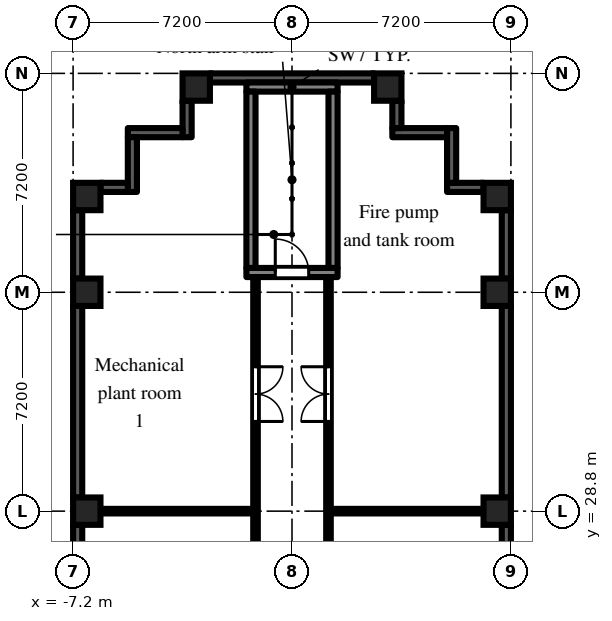
"""IFC4 building model, lengths in metres.
Left out: names, types, materials, properties, quantities, classifications, styles, units other than length and angle.
Written with IfcOpenShell. Run it as: python <this file> out.ifc"""

import sys

from ifc_helpers import new_model, si_unit, direction, frame, frame_2d, origin, origin_2d, place, context, subcontext, project, spatial, polyline, rectangle, outline, extrude, element, fill, save


model = new_model("IFC4")
c1 = context("Model", 3, precision=1e-05, world=origin(), true_north=direction((0.0, 1.0)))
c2 = subcontext(c1, "Body", "Model", "MODEL_VIEW")
j1 = project(units=[si_unit("LENGTHUNIT", "METRE"), si_unit("PLANEANGLEUNIT", "RADIAN")], contexts=[c1])
p1 = place(None, origin())
s1 = spatial("IfcSite", under=j1, at=p1, CompositionType="ELEMENT")
p2 = place(p1, origin())
s2 = spatial("IfcBuilding", under=s1, at=p2, CompositionType="ELEMENT")
p3 = place(p2, frame((0.0, 0.0, 62.7)))
s3 = spatial("IfcBuildingStorey", under=s2, at=p3, CompositionType="ELEMENT", Elevation=62.7)
for number, where, z_axis, x_axis in (
    (1, (-6.75, 28.8, 0.0), (0.0, 0.0, 1.0), (1.0, 0.0, 0.0)),
    (2, (-6.75, 36.0, 0.0), (0.0, 0.0, 1.0), (1.0, 0.0, 0.0)),
    (3, (-6.75, 39.15, 0.0), (0.0, 0.0, 1.0), (1.0, 0.0, 0.0)),
    (4, (-3.15, 42.75, 0.0), (0.0, 0.0, 1.0), (1.0, 0.0, 0.0)),
    (5, (3.15, 42.75, 0.0), (0.0, 0.0, 1.0), (1.0, 0.0, 0.0)),
    (6, (6.75, 28.8, 0.0), (0.0, 0.0, 1.0), (1.0, 0.0, 0.0)),
    (7, (6.75, 36.0, 0.0), (0.0, 0.0, 1.0), (1.0, 0.0, 0.0)),
    (8, (6.75, 39.15, 0.0), (0.0, 0.0, 1.0), (1.0, 0.0, 0.0)),
):
    element("IfcColumn", number, at=place(p3, frame(where, z_axis=z_axis, x_axis=x_axis)), inside=s3, PredefinedType="COLUMN", context=c2, shape_type="SweptSolid", body=[
        extrude(rectangle(XDim=0.9, YDim=0.9, at=origin_2d()), origin(), (0.0, 0.0, 1.0), 4.2),
    ])
p4 = place(p3, frame((7.05, 22.05, 0.0), z_axis=(0.0, 0.0, 1.0), x_axis=(0.0, 1.0, 0.0)))
e9 = element("IfcWall", 9, at=p4, inside=s3, PredefinedType="SOLIDWALL", context=c2, shape_type="SweptSolid", body=[
    extrude(outline(polyline([(0.0, 0.0), (6.3, 0.0), (6.3, 3.775), (1.952, 3.775), (1.95, 3.4), (1.15, 3.4), (1.148, 3.775), (0.0, 3.775), (0.0, 0.0)])), frame((0.0, 0.15, 0.0), z_axis=(0.0, -1.0, 0.0), x_axis=(1.0, 0.0, 0.0)), (0.0, 0.0, 1.0), 0.3),
])
p5 = place(p3, frame((7.05, 29.25, 0.0), z_axis=(0.0, 0.0, 1.0), x_axis=(0.0, 1.0, 0.0)))
e10 = element("IfcWall", 10, at=p5, inside=s3, PredefinedType="SOLIDWALL", context=c2, shape_type="SweptSolid", body=[
    extrude(rectangle(XDim=6.3, YDim=0.3, at=frame_2d((3.15, 0.0))), origin(), (0.0, 0.0, 1.0), 3.775),
])
p6 = place(p3, frame((7.05, 36.45, 0.0), z_axis=(0.0, 0.0, 1.0), x_axis=(0.0, 1.0, 0.0)))
e11 = element("IfcWall", 11, at=p6, inside=s3, PredefinedType="SOLIDWALL", context=c2, shape_type="SweptSolid", body=[
    extrude(rectangle(XDim=2.25, YDim=0.3, at=frame_2d((1.125, 0.0))), origin(), (0.0, 0.0, 1.0), 3.775),
])
p7 = place(p3, frame((6.3, 39.45, 0.0), z_axis=(0.0, 0.0, 1.0), x_axis=(-1.0, 0.0, 0.0)))
e12 = element("IfcWall", 12, at=p7, inside=s3, PredefinedType="SOLIDWALL", context=c2, shape_type="SweptSolid", body=[
    extrude(rectangle(XDim=1.2, YDim=0.3, at=frame_2d((0.6, 0.0))), origin(), (0.0, 0.0, 1.0), 3.775),
])
p8 = place(p3, frame((5.25, 39.6, 0.0), z_axis=(0.0, 0.0, 1.0), x_axis=(0.0, 1.0, 0.0)))
e13 = element("IfcWall", 13, at=p8, inside=s3, PredefinedType="SOLIDWALL", context=c2, shape_type="SweptSolid", body=[
    extrude(rectangle(XDim=1.8, YDim=0.3, at=frame_2d((0.9, 0.0))), origin(), (0.0, 0.0, 1.0), 3.775),
])
p9 = place(p3, frame((5.1, 41.25, 0.0), z_axis=(0.0, 0.0, 1.0), x_axis=(-1.0, 0.0, 0.0)))
e14 = element("IfcWall", 14, at=p9, inside=s3, PredefinedType="SOLIDWALL", context=c2, shape_type="SweptSolid", body=[
    extrude(rectangle(XDim=1.8, YDim=0.3, at=frame_2d((0.9, 0.0))), origin(), (0.0, 0.0, 1.0), 3.775),
])
p10 = place(p3, frame((3.45, 41.4, 0.0), z_axis=(0.0, 0.0, 1.0), x_axis=(0.0, 1.0, 0.0)))
e15 = element("IfcWall", 15, at=p10, inside=s3, PredefinedType="SOLIDWALL", context=c2, shape_type="SweptSolid", body=[
    extrude(rectangle(XDim=0.9, YDim=0.3, at=frame_2d((0.45, 0.0))), origin(), (0.0, 0.0, 1.0), 3.775),
])
p11 = place(p3, frame((2.7, 43.05, 0.0), z_axis=(0.0, 0.0, 1.0), x_axis=(-1.0, 0.0, 0.0)))
e16 = element("IfcWall", 16, at=p11, inside=s3, PredefinedType="SOLIDWALL", context=c2, shape_type="SweptSolid", body=[
    extrude(rectangle(XDim=5.4, YDim=0.3, at=frame_2d((2.7, 0.0))), origin(), (0.0, 0.0, 1.0), 3.775),
])
p12 = place(p3, frame((-3.45, 42.3, 0.0), z_axis=(0.0, 0.0, 1.0), x_axis=(0.0, -1.0, 0.0)))
e17 = element("IfcWall", 17, at=p12, inside=s3, PredefinedType="SOLIDWALL", context=c2, shape_type="SweptSolid", body=[
    extrude(rectangle(XDim=1.2, YDim=0.3, at=frame_2d((0.6, 0.0))), origin(), (0.0, 0.0, 1.0), 3.775),
])
p13 = place(p3, frame((-3.6, 41.25, 0.0), z_axis=(0.0, 0.0, 1.0), x_axis=(-1.0, 0.0, 0.0)))
e18 = element("IfcWall", 18, at=p13, inside=s3, PredefinedType="SOLIDWALL", context=c2, shape_type="SweptSolid", body=[
    extrude(rectangle(XDim=1.8, YDim=0.3, at=frame_2d((0.9, 0.0))), origin(), (0.0, 0.0, 1.0), 3.775),
])
p14 = place(p3, frame((-5.25, 41.1, 0.0), z_axis=(0.0, 0.0, 1.0), x_axis=(0.0, -1.0, 0.0)))
e19 = element("IfcWall", 19, at=p14, inside=s3, PredefinedType="SOLIDWALL", context=c2, shape_type="SweptSolid", body=[
    extrude(rectangle(XDim=1.8, YDim=0.3, at=frame_2d((0.9, 0.0))), origin(), (0.0, 0.0, 1.0), 3.775),
])
p15 = place(p3, frame((-5.4, 39.45, 0.0), z_axis=(0.0, 0.0, 1.0), x_axis=(-1.0, 0.0, 0.0)))
e20 = element("IfcWall", 20, at=p15, inside=s3, PredefinedType="SOLIDWALL", context=c2, shape_type="SweptSolid", body=[
    extrude(rectangle(XDim=0.9, YDim=0.3, at=frame_2d((0.45, 0.0))), origin(), (0.0, 0.0, 1.0), 3.775),
])
p16 = place(p3, frame((-7.05, 38.7, 0.0), z_axis=(0.0, 0.0, 1.0), x_axis=(0.0, -1.0, 0.0)))
e21 = element("IfcWall", 21, at=p16, inside=s3, PredefinedType="SOLIDWALL", context=c2, shape_type="SweptSolid", body=[
    extrude(rectangle(XDim=2.25, YDim=0.3, at=frame_2d((1.125, 0.0))), origin(), (0.0, 0.0, 1.0), 3.775),
])
p17 = place(p3, frame((-7.05, 35.55, 0.0), z_axis=(0.0, 0.0, 1.0), x_axis=(0.0, -1.0, 0.0)))
e22 = element("IfcWall", 22, at=p17, inside=s3, PredefinedType="SOLIDWALL", context=c2, shape_type="SweptSolid", body=[
    extrude(rectangle(XDim=6.3, YDim=0.3, at=frame_2d((3.15, 0.0))), origin(), (0.0, 0.0, 1.0), 3.775),
])
p18 = place(p3, frame((-7.05, 28.35, 0.0), z_axis=(0.0, 0.0, 1.0), x_axis=(0.0, -1.0, 0.0)))
e23 = element("IfcWall", 23, at=p18, inside=s3, PredefinedType="SOLIDWALL", context=c2, shape_type="SweptSolid", body=[
    extrude(outline(polyline([(0.0, 0.0), (6.3, 0.0), (6.3, 3.775), (5.152, 3.775), (5.15, 3.4), (4.35, 3.4), (4.348, 3.775), (0.0, 3.775), (0.0, 0.0)])), frame((0.0, 0.15, 0.0), z_axis=(0.0, -1.0, 0.0), x_axis=(1.0, 0.0, 0.0)), (0.0, 0.0, 1.0), 0.3),
])
p19 = place(p3, frame((-1.5, 36.65, 0.0), z_axis=(0.0, 0.0, 1.0), x_axis=(1.0, 0.0, 0.0)))
e24 = element("IfcWall", 24, at=p19, inside=s3, PredefinedType="SHEAR", context=c2, shape_type="SweptSolid", body=[
    extrude(rectangle(XDim=3.0, YDim=0.3, at=frame_2d((1.5, 0.0))), origin(), (0.0, 0.0, 1.0), 3.775),
])
p20 = place(p19, frame((0.95, 0.0, 0.0)))
e25 = element("IfcOpeningElement", 25, at=p20, cuts=e24, PredefinedType="OPENING", context=c2, shape_type="SweptSolid", body=[
    extrude(rectangle(XDim=1.1, YDim=2.1, at=frame_2d((0.55, 1.05))), frame((0.0, 0.16, 0.0), z_axis=(0.0, -1.0, 0.0), x_axis=(1.0, 0.0, 0.0)), (0.0, 0.0, 1.0), 0.32),
])
p21 = place(p3, frame((-1.5, 42.75, 0.0), z_axis=(0.0, 0.0, 1.0), x_axis=(1.0, 0.0, 0.0)))
e26 = element("IfcWall", 26, at=p21, inside=s3, PredefinedType="SHEAR", context=c2, shape_type="SweptSolid", body=[
    extrude(rectangle(XDim=3.0, YDim=0.3, at=frame_2d((1.5, 0.0))), origin(), (0.0, 0.0, 1.0), 3.775),
])
for number, where, z_axis, x_axis in (
    (27, (-1.35, 36.8, 0.0), (0.0, 0.0, 1.0), (0.0, 1.0, 0.0)),
    (28, (1.35, 36.8, 0.0), (0.0, 0.0, 1.0), (0.0, 1.0, 0.0)),
):
    element("IfcWall", number, at=place(p3, frame(where, z_axis=z_axis, x_axis=x_axis)), inside=s3, PredefinedType="SHEAR", context=c2, shape_type="SweptSolid", body=[
        extrude(rectangle(XDim=5.8, YDim=0.3, at=frame_2d((2.9, 0.0))), origin(), (0.0, 0.0, 1.0), 3.775),
    ])
p22 = place(p3, frame((-6.9, 28.8, 0.0), z_axis=(0.0, 0.0, 1.0), x_axis=(1.0, 0.0, 0.0)))
e29 = element("IfcWall", 29, at=p22, inside=s3, PredefinedType="PARTITIONING", context=c2, shape_type="SweptSolid", body=[
    extrude(rectangle(XDim=5.625, YDim=0.15, at=frame_2d((2.812, 0.0))), origin(), (0.0, 0.0, 1.0), 3.775),
])
p23 = place(p3, frame((-1.2, 1.125, 0.0), z_axis=(0.0, 0.0, 1.0), x_axis=(0.0, 1.0, 0.0)))
e30 = element("IfcWall", 30, at=p23, inside=s3, PredefinedType="PARTITIONING", context=c2, shape_type="SweptSolid", body=[
    extrude(outline(polyline([(0.0, 0.0), (35.375, 0.0), (35.375, 3.775), (22.877, 3.775), (22.875, 3.4), (22.075, 3.4), (22.073, 3.775), (0.0, 3.775), (0.0, 0.0)])), frame((0.0, 0.075, 0.0), z_axis=(0.0, -1.0, 0.0), x_axis=(1.0, 0.0, 0.0)), (0.0, 0.0, 1.0), 0.15),
])
p24 = place(p23, frame((4.025, 0.0, 0.0)))
e31 = element("IfcOpeningElement", 31, at=p24, cuts=e30, PredefinedType="OPENING", context=c2, shape_type="SweptSolid", body=[
    extrude(rectangle(XDim=1.2, YDim=2.1, at=frame_2d((0.6, 1.05))), frame((0.0, 0.085, 0.0), z_axis=(0.0, -1.0, 0.0), x_axis=(1.0, 0.0, 0.0)), (0.0, 0.0, 1.0), 0.17),
])
p25 = place(p23, frame((8.775, 0.0, 0.0)))
e32 = element("IfcOpeningElement", 32, at=p25, cuts=e30, PredefinedType="OPENING", context=c2, shape_type="SweptSolid", body=[
    extrude(rectangle(XDim=1.8, YDim=2.1, at=frame_2d((0.9, 1.05))), frame((0.0, 0.085, 0.0), z_axis=(0.0, -1.0, 0.0), x_axis=(1.0, 0.0, 0.0)), (0.0, 0.0, 1.0), 0.17),
])
p26 = place(p23, frame((15.975, 0.0, 0.0)))
e33 = element("IfcOpeningElement", 33, at=p26, cuts=e30, PredefinedType="OPENING", context=c2, shape_type="SweptSolid", body=[
    extrude(rectangle(XDim=1.8, YDim=2.1, at=frame_2d((0.9, 1.05))), frame((0.0, 0.085, 0.0), z_axis=(0.0, -1.0, 0.0), x_axis=(1.0, 0.0, 0.0)), (0.0, 0.0, 1.0), 0.17),
])
p27 = place(p23, frame((23.175, 0.0, 0.0)))
e34 = element("IfcOpeningElement", 34, at=p27, cuts=e30, PredefinedType="OPENING", context=c2, shape_type="SweptSolid", body=[
    extrude(rectangle(XDim=1.8, YDim=2.1, at=frame_2d((0.9, 1.05))), frame((0.0, 0.085, 0.0), z_axis=(0.0, -1.0, 0.0), x_axis=(1.0, 0.0, 0.0)), (0.0, 0.0, 1.0), 0.17),
])
p28 = place(p23, frame((30.625, 0.0, 0.0)))
e35 = element("IfcOpeningElement", 35, at=p28, cuts=e30, PredefinedType="OPENING", context=c2, shape_type="SweptSolid", body=[
    extrude(rectangle(XDim=1.8, YDim=2.1, at=frame_2d((0.9, 1.05))), frame((0.0, 0.085, 0.0), z_axis=(0.0, -1.0, 0.0), x_axis=(1.0, 0.0, 0.0)), (0.0, 0.0, 1.0), 0.17),
])
p29 = place(p3, frame((1.2, 1.125, 0.0), z_axis=(0.0, 0.0, 1.0), x_axis=(0.0, 1.0, 0.0)))
e36 = element("IfcWall", 36, at=p29, inside=s3, PredefinedType="PARTITIONING", context=c2, shape_type="SweptSolid", body=[
    extrude(outline(polyline([(0.0, 0.0), (35.375, 0.0), (35.375, 3.775), (22.877, 3.775), (22.875, 3.4), (22.075, 3.4), (22.073, 3.775), (0.0, 3.775), (0.0, 0.0)])), frame((0.0, 0.075, 0.0), z_axis=(0.0, -1.0, 0.0), x_axis=(1.0, 0.0, 0.0)), (0.0, 0.0, 1.0), 0.15),
])
p30 = place(p29, frame((0.175, 0.0, 0.0)))
e37 = element("IfcOpeningElement", 37, at=p30, cuts=e36, PredefinedType="OPENING", context=c2, shape_type="SweptSolid", body=[
    extrude(rectangle(XDim=0.9, YDim=2.1, at=frame_2d((0.45, 1.05))), frame((0.0, 0.085, 0.0), z_axis=(0.0, -1.0, 0.0), x_axis=(1.0, 0.0, 0.0)), (0.0, 0.0, 1.0), 0.17),
])
p31 = place(p29, frame((4.225, 0.0, 0.0)))
e38 = element("IfcOpeningElement", 38, at=p31, cuts=e36, PredefinedType="OPENING", context=c2, shape_type="SweptSolid", body=[
    extrude(rectangle(XDim=1.2, YDim=2.1, at=frame_2d((0.6, 1.05))), frame((0.0, 0.085, 0.0), z_axis=(0.0, -1.0, 0.0), x_axis=(1.0, 0.0, 0.0)), (0.0, 0.0, 1.0), 0.17),
])
p32 = place(p29, frame((8.775, 0.0, 0.0)))
e39 = element("IfcOpeningElement", 39, at=p32, cuts=e36, PredefinedType="OPENING", context=c2, shape_type="SweptSolid", body=[
    extrude(rectangle(XDim=1.8, YDim=2.1, at=frame_2d((0.9, 1.05))), frame((0.0, 0.085, 0.0), z_axis=(0.0, -1.0, 0.0), x_axis=(1.0, 0.0, 0.0)), (0.0, 0.0, 1.0), 0.17),
])
p33 = place(p29, frame((15.975, 0.0, 0.0)))
e40 = element("IfcOpeningElement", 40, at=p33, cuts=e36, PredefinedType="OPENING", context=c2, shape_type="SweptSolid", body=[
    extrude(rectangle(XDim=1.8, YDim=2.1, at=frame_2d((0.9, 1.05))), frame((0.0, 0.085, 0.0), z_axis=(0.0, -1.0, 0.0), x_axis=(1.0, 0.0, 0.0)), (0.0, 0.0, 1.0), 0.17),
])
p34 = place(p29, frame((23.175, 0.0, 0.0)))
e41 = element("IfcOpeningElement", 41, at=p34, cuts=e36, PredefinedType="OPENING", context=c2, shape_type="SweptSolid", body=[
    extrude(rectangle(XDim=1.8, YDim=2.1, at=frame_2d((0.9, 1.05))), frame((0.0, 0.085, 0.0), z_axis=(0.0, -1.0, 0.0), x_axis=(1.0, 0.0, 0.0)), (0.0, 0.0, 1.0), 0.17),
])
p35 = place(p29, frame((30.625, 0.0, 0.0)))
e42 = element("IfcOpeningElement", 42, at=p35, cuts=e36, PredefinedType="OPENING", context=c2, shape_type="SweptSolid", body=[
    extrude(rectangle(XDim=1.8, YDim=2.1, at=frame_2d((0.9, 1.05))), frame((0.0, 0.085, 0.0), z_axis=(0.0, -1.0, 0.0), x_axis=(1.0, 0.0, 0.0)), (0.0, 0.0, 1.0), 0.17),
])
p36 = place(p3, frame((1.275, 28.8, 0.0), z_axis=(0.0, 0.0, 1.0), x_axis=(1.0, 0.0, 0.0)))
e43 = element("IfcWall", 43, at=p36, inside=s3, PredefinedType="PARTITIONING", context=c2, shape_type="SweptSolid", body=[
    extrude(rectangle(XDim=5.625, YDim=0.15, at=frame_2d((2.812, 0.0))), origin(), (0.0, 0.0, 1.0), 3.775),
])
p37 = place(p20, origin())
e44 = element("IfcDoor", 44, at=p37, inside=s3, OperationType="SINGLE_SWING_LEFT", PredefinedType="DOOR", context=c2, shape_type="SweptSolid", body=[
    extrude(rectangle(XDim=1.1, YDim=2.1, at=frame_2d((0.55, 1.05))), frame((0.0, 0.025, 0.0), z_axis=(0.0, -1.0, 0.0), x_axis=(1.0, 0.0, 0.0)), (0.0, 0.0, 1.0), 0.05),
])
fill(e25, e44)
p38 = place(p28, frame((1.8, 0.0, 0.0), z_axis=(0.0, 0.0, 1.0), x_axis=(-1.0, 0.0, 0.0)))
e45 = element("IfcDoor", 45, at=p38, inside=s3, OperationType="DOUBLE_DOOR_DOUBLE_SWING", PredefinedType="DOOR", context=c2, shape_type="SweptSolid", body=[
    extrude(rectangle(XDim=1.8, YDim=2.1, at=frame_2d((0.9, 1.05))), frame((0.0, 0.025, 0.0), z_axis=(0.0, -1.0, 0.0), x_axis=(1.0, 0.0, 0.0)), (0.0, 0.0, 1.0), 0.05),
])
fill(e35, e45)
p39 = place(p35, origin())
e46 = element("IfcDoor", 46, at=p39, inside=s3, OperationType="DOUBLE_DOOR_DOUBLE_SWING", PredefinedType="DOOR", context=c2, shape_type="SweptSolid", body=[
    extrude(rectangle(XDim=1.8, YDim=2.1, at=frame_2d((0.9, 1.05))), frame((0.0, 0.025, 0.0), z_axis=(0.0, -1.0, 0.0), x_axis=(1.0, 0.0, 0.0)), (0.0, 0.0, 1.0), 0.05),
])
fill(e42, e46)
save(model, sys.argv[1])
